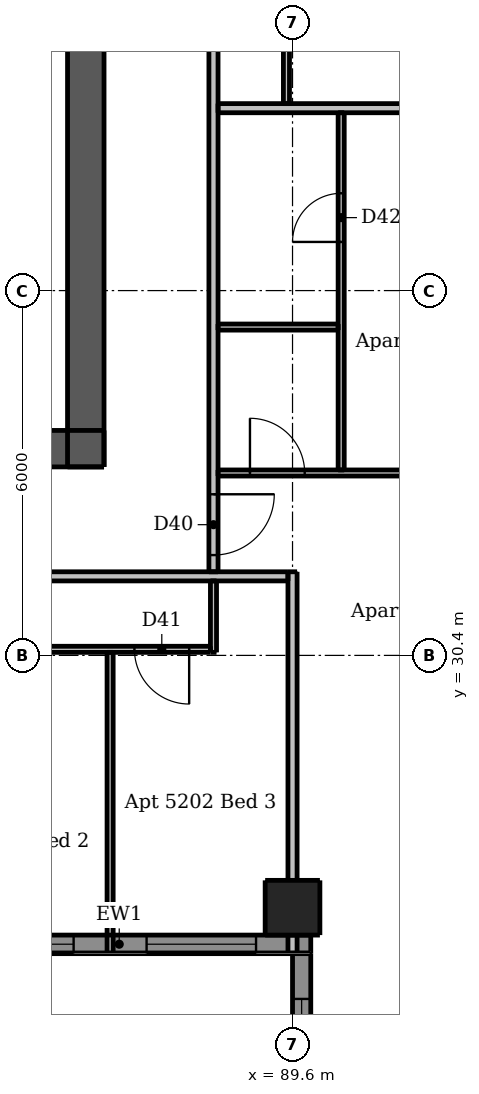
"""IFC4 building model, lengths in metres.
Left out: names, types, materials, properties, quantities, classifications, styles, units other than length and angle.
Written with IfcOpenShell. Run it as: python <this file> out.ifc"""

import sys

from ifc_helpers import new_model, si_unit, direction, frame, frame_2d, origin, origin_2d, place, context, subcontext, project, spatial, rectangle, extrude, element, fill, save


model = new_model("IFC4")
c1 = context("Model", 3, precision=1e-05, world=origin(), true_north=direction((0.0, 1.0)))
c2 = subcontext(c1, "Body", "Model", "MODEL_VIEW")
j1 = project(units=[si_unit("LENGTHUNIT", "METRE"), si_unit("PLANEANGLEUNIT", "RADIAN")], contexts=[c1])
p1 = place(None, origin())
s1 = spatial("IfcSite", under=j1, at=p1, CompositionType="ELEMENT")
p2 = place(p1, origin())
s2 = spatial("IfcBuilding", under=s1, at=p2, CompositionType="ELEMENT")
p3 = place(p2, frame((0.0, 0.0, 196.9)))
s3 = spatial("IfcBuildingStorey", under=s2, at=p3, CompositionType="ELEMENT", Elevation=196.9)
p4 = place(p3, frame((62.5, 33.8, 0.0), z_axis=(0.0, 0.0, 1.0), x_axis=(1.0, 0.0, 0.0)))
e1 = element("IfcWall", 1, at=p4, inside=s3, PredefinedType="SHEAR", context=c2, shape_type="SweptSolid", body=[
    extrude(rectangle(XDim=24.0, YDim=0.6, at=frame_2d((12.0, 0.0))), origin(), (0.0, 0.0, 1.0), 3.05),
])
p5 = place(p4, frame((1.925, 0.0, 0.0)))
e2 = element("IfcOpeningElement", 2, at=p5, cuts=e1, PredefinedType="OPENING", context=c2, shape_type="SweptSolid", body=[
    extrude(rectangle(XDim=1.1, YDim=2.1, at=frame_2d((0.55, 1.05))), frame((0.0, 0.31, 0.0), z_axis=(0.0, -1.0, 0.0), x_axis=(1.0, 0.0, 0.0)), (0.0, 0.0, 1.0), 0.62),
])
p6 = place(p4, frame((20.975, 0.0, 0.0)))
e3 = element("IfcOpeningElement", 3, at=p6, cuts=e1, PredefinedType="OPENING", context=c2, shape_type="SweptSolid", body=[
    extrude(rectangle(XDim=1.1, YDim=2.1, at=frame_2d((0.55, 1.05))), frame((0.0, 0.31, 0.0), z_axis=(0.0, -1.0, 0.0), x_axis=(1.0, 0.0, 0.0)), (0.0, 0.0, 1.0), 0.62),
])
p7 = place(p4, frame((8.0, 0.0, 0.0)))
e4 = element("IfcOpeningElement", 4, at=p7, cuts=e1, PredefinedType="OPENING", context=c2, shape_type="SweptSolid", body=[
    extrude(rectangle(XDim=1.1, YDim=2.1, at=frame_2d((0.55, 1.05))), frame((0.0, 0.31, 0.0), z_axis=(0.0, -1.0, 0.0), x_axis=(1.0, 0.0, 0.0)), (0.0, 0.0, 1.0), 0.62),
])
p8 = place(p4, frame((15.3, 0.0, 0.0)))
e5 = element("IfcOpeningElement", 5, at=p8, cuts=e1, PredefinedType="OPENING", context=c2, shape_type="SweptSolid", body=[
    extrude(rectangle(XDim=0.9, YDim=2.1, at=frame_2d((0.45, 1.05))), frame((0.0, 0.31, 0.0), z_axis=(0.0, -1.0, 0.0), x_axis=(1.0, 0.0, 0.0)), (0.0, 0.0, 1.0), 0.62),
])
p9 = place(p3, frame((86.2, 33.5, 0.0), z_axis=(0.0, 0.0, 1.0), x_axis=(0.0, 1.0, 0.0)))
e6 = element("IfcWall", 6, at=p9, inside=s3, PredefinedType="SHEAR", context=c2, shape_type="SweptSolid", body=[
    extrude(rectangle(XDim=24.0, YDim=0.6, at=frame_2d((12.0, 0.0))), origin(), (0.0, 0.0, 1.0), 3.05),
])
p10 = place(p9, frame((11.2, 0.0, 0.0)))
e7 = element("IfcOpeningElement", 7, at=p10, cuts=e6, PredefinedType="OPENING", context=c2, shape_type="SweptSolid", body=[
    extrude(rectangle(XDim=1.6, YDim=2.1, at=frame_2d((0.8, 1.05))), frame((0.0, 0.31, 0.0), z_axis=(0.0, -1.0, 0.0), x_axis=(1.0, 0.0, 0.0)), (0.0, 0.0, 1.0), 0.62),
])
p11 = place(p3, frame((89.6, 26.25, 0.0), z_axis=(0.0, 0.0, 1.0), x_axis=(1.0, 0.0, 0.0)))
e8 = element("IfcColumn", 8, at=p11, inside=s3, PredefinedType="COLUMN", context=c2, shape_type="SweptSolid", body=[
    extrude(rectangle(XDim=0.9, YDim=0.9, at=origin_2d()), origin(), (0.0, 0.0, 1.0), 3.05),
])
p12 = place(p3, frame((89.75, 25.5, 0.0), z_axis=(0.0, 0.0, 1.0), x_axis=(0.0, -1.0, 0.0)))
e9 = element("IfcWall", 9, at=p12, inside=s3, PredefinedType="SOLIDWALL", context=c2, shape_type="SweptSolid", body=[
    extrude(rectangle(XDim=3.0, YDim=0.3, at=frame_2d((1.5, 0.0))), origin(), (0.0, 0.0, 1.0), 3.05),
])
p13 = place(p12, frame((0.75, 0.0, 0.9)))
e10 = element("IfcOpeningElement", 10, at=p13, cuts=e9, PredefinedType="OPENING", context=c2, shape_type="SweptSolid", body=[
    extrude(rectangle(XDim=1.5, YDim=1.5, at=frame_2d((0.75, 0.75))), frame((0.0, 0.16, 0.0), z_axis=(0.0, -1.0, 0.0), x_axis=(1.0, 0.0, 0.0)), (0.0, 0.0, 1.0), 0.32),
])
p14 = place(p3, frame((83.6, 25.65, 0.0), z_axis=(0.0, 0.0, 1.0), x_axis=(1.0, 0.0, 0.0)))
e11 = element("IfcWall", 11, at=p14, inside=s3, PredefinedType="SOLIDWALL", context=c2, shape_type="SweptSolid", body=[
    extrude(rectangle(XDim=6.3, YDim=0.3, at=frame_2d((3.15, 0.0))), origin(), (0.0, 0.0, 1.0), 3.05),
])
p15 = place(p14, frame((0.6, 0.0, 0.15)))
e12 = element("IfcOpeningElement", 12, at=p15, cuts=e11, PredefinedType="OPENING", context=c2, shape_type="SweptSolid", body=[
    extrude(rectangle(XDim=1.8, YDim=2.1, at=frame_2d((0.9, 1.05))), frame((0.0, 0.16, 0.0), z_axis=(0.0, -1.0, 0.0), x_axis=(1.0, 0.0, 0.0)), (0.0, 0.0, 1.0), 0.32),
])
p16 = place(p14, frame((3.6, 0.0, 0.15)))
e13 = element("IfcOpeningElement", 13, at=p16, cuts=e11, PredefinedType="OPENING", context=c2, shape_type="SweptSolid", body=[
    extrude(rectangle(XDim=1.8, YDim=2.1, at=frame_2d((0.9, 1.05))), frame((0.0, 0.16, 0.0), z_axis=(0.0, -1.0, 0.0), x_axis=(1.0, 0.0, 0.0)), (0.0, 0.0, 1.0), 0.32),
])
p17 = place(p3, frame((86.6, 25.5, 0.0), z_axis=(0.0, 0.0, 1.0), x_axis=(0.0, 1.0, 0.0)))
e14 = element("IfcWall", 14, at=p17, inside=s3, PredefinedType="PARTITIONING", context=c2, shape_type="SweptSolid", body=[
    extrude(rectangle(XDim=4.95, YDim=0.1, at=frame_2d((2.475, 0.0))), origin(), (0.0, 0.0, 1.0), 3.05),
])
p18 = place(p3, frame((88.3, 30.45, 0.0), z_axis=(0.0, 0.0, 1.0), x_axis=(0.0, 1.0, 0.0)))
e15 = element("IfcWall", 15, at=p18, inside=s3, PredefinedType="PARTITIONING", context=c2, shape_type="SweptSolid", body=[
    extrude(rectangle(XDim=1.175, YDim=0.1, at=frame_2d((0.587, 0.0))), origin(), (0.0, 0.0, 1.0), 3.05),
])
p19 = place(p3, frame((89.5, 60.325, 0.0), z_axis=(0.0, 0.0, 1.0), x_axis=(0.0, -1.0, 0.0)))
e16 = element("IfcWall", 16, at=p19, inside=s3, PredefinedType="PARTITIONING", context=c2, shape_type="SweptSolid", body=[
    extrude(rectangle(XDim=20.85, YDim=0.1, at=frame_2d((10.425, 0.0))), origin(), (0.0, 0.0, 1.0), 2.51),
])
p20 = place(p19, frame((10.575, 0.0, 0.0)))
e17 = element("IfcOpeningElement", 17, at=p20, cuts=e16, PredefinedType="OPENING", context=c2, shape_type="SweptSolid", body=[
    extrude(rectangle(XDim=0.9, YDim=2.1, at=frame_2d((0.45, 1.05))), frame((0.0, 0.06, 0.0), z_axis=(0.0, -1.0, 0.0), x_axis=(1.0, 0.0, 0.0)), (0.0, 0.0, 1.0), 0.12),
])
p21 = place(p19, frame((6.675, 0.0, 0.0)))
e18 = element("IfcOpeningElement", 18, at=p21, cuts=e16, PredefinedType="OPENING", context=c2, shape_type="SweptSolid", body=[
    extrude(rectangle(XDim=0.9, YDim=2.1, at=frame_2d((0.45, 1.05))), frame((0.0, 0.06, 0.0), z_axis=(0.0, -1.0, 0.0), x_axis=(1.0, 0.0, 0.0)), (0.0, 0.0, 1.0), 0.12),
])
p22 = place(p19, frame((8.775, 0.0, 0.0)))
e19 = element("IfcOpeningElement", 19, at=p22, cuts=e16, PredefinedType="OPENING", context=c2, shape_type="SweptSolid", body=[
    extrude(rectangle(XDim=0.9, YDim=2.1, at=frame_2d((0.45, 1.05))), frame((0.0, 0.06, 0.0), z_axis=(0.0, -1.0, 0.0), x_axis=(1.0, 0.0, 0.0)), (0.0, 0.0, 1.0), 0.12),
])
p23 = place(p19, frame((19.075, 0.0, 0.0)))
e20 = element("IfcOpeningElement", 20, at=p23, cuts=e16, PredefinedType="OPENING", context=c2, shape_type="SweptSolid", body=[
    extrude(rectangle(XDim=0.9, YDim=2.1, at=frame_2d((0.45, 1.05))), frame((0.0, 0.06, 0.0), z_axis=(0.0, -1.0, 0.0), x_axis=(1.0, 0.0, 0.0)), (0.0, 0.0, 1.0), 0.12),
])
p24 = place(p19, frame((15.775, 0.0, 0.0)))
e21 = element("IfcOpeningElement", 21, at=p24, cuts=e16, PredefinedType="OPENING", context=c2, shape_type="SweptSolid", body=[
    extrude(rectangle(XDim=0.9, YDim=2.1, at=frame_2d((0.45, 1.05))), frame((0.0, 0.06, 0.0), z_axis=(0.0, -1.0, 0.0), x_axis=(1.0, 0.0, 0.0)), (0.0, 0.0, 1.0), 0.12),
])
p25 = place(p19, frame((1.275, 0.0, 0.0)))
e22 = element("IfcOpeningElement", 22, at=p25, cuts=e16, PredefinedType="OPENING", context=c2, shape_type="SweptSolid", body=[
    extrude(rectangle(XDim=0.9, YDim=2.1, at=frame_2d((0.45, 1.05))), frame((0.0, 0.06, 0.0), z_axis=(0.0, -1.0, 0.0), x_axis=(1.0, 0.0, 0.0)), (0.0, 0.0, 1.0), 0.12),
])
p26 = place(p19, frame((12.725, 0.0, 0.0)))
e23 = element("IfcOpeningElement", 23, at=p26, cuts=e16, PredefinedType="OPENING", context=c2, shape_type="SweptSolid", body=[
    extrude(rectangle(XDim=0.8, YDim=2.1, at=frame_2d((0.4, 1.05))), frame((0.0, 0.06, 0.0), z_axis=(0.0, -1.0, 0.0), x_axis=(1.0, 0.0, 0.0)), (0.0, 0.0, 1.0), 0.12),
])
p27 = place(p19, frame((4.325, 0.0, 0.0)))
e24 = element("IfcOpeningElement", 24, at=p27, cuts=e16, PredefinedType="OPENING", context=c2, shape_type="SweptSolid", body=[
    extrude(rectangle(XDim=0.8, YDim=2.1, at=frame_2d((0.4, 1.05))), frame((0.0, 0.06, 0.0), z_axis=(0.0, -1.0, 0.0), x_axis=(1.0, 0.0, 0.0)), (0.0, 0.0, 1.0), 0.12),
])
p28 = place(p3, frame((90.4, 33.45, 0.0), z_axis=(0.0, 0.0, 1.0), x_axis=(0.0, 1.0, 0.0)))
e25 = element("IfcWall", 25, at=p28, inside=s3, PredefinedType="PARTITIONING", context=c2, shape_type="SweptSolid", body=[
    extrude(rectangle(XDim=5.875, YDim=0.1, at=frame_2d((2.938, 0.0))), origin(), (0.0, 0.0, 1.0), 3.05),
])
p29 = place(p28, frame((3.75, 0.0, 0.0)))
e26 = element("IfcOpeningElement", 26, at=p29, cuts=e25, PredefinedType="OPENING", context=c2, shape_type="SweptSolid", body=[
    extrude(rectangle(XDim=0.8, YDim=2.1, at=frame_2d((0.4, 1.05))), frame((0.0, 0.06, 0.0), z_axis=(0.0, -1.0, 0.0), x_axis=(1.0, 0.0, 0.0)), (0.0, 0.0, 1.0), 0.12),
])
p30 = place(p3, frame((88.375, 35.8, 0.0), z_axis=(0.0, 0.0, 1.0), x_axis=(1.0, 0.0, 0.0)))
e27 = element("IfcWall", 27, at=p30, inside=s3, PredefinedType="PARTITIONING", context=c2, shape_type="SweptSolid", body=[
    extrude(rectangle(XDim=1.975, YDim=0.1, at=frame_2d((0.988, 0.0))), origin(), (0.0, 0.0, 1.0), 3.05),
])
p31 = place(p3, frame((88.375, 33.4, 0.0), z_axis=(0.0, 0.0, 1.0), x_axis=(1.0, 0.0, 0.0)))
e28 = element("IfcWall", 28, at=p31, inside=s3, PredefinedType="PARTITIONING", context=c2, shape_type="SweptSolid", body=[
    extrude(rectangle(XDim=7.625, YDim=0.1, at=frame_2d((3.812, 0.0))), origin(), (0.0, 0.0, 1.0), 3.05),
])
p32 = place(p31, frame((0.525, 0.0, 0.0)))
e29 = element("IfcOpeningElement", 29, at=p32, cuts=e28, PredefinedType="OPENING", context=c2, shape_type="SweptSolid", body=[
    extrude(rectangle(XDim=0.9, YDim=2.1, at=frame_2d((0.45, 1.05))), frame((0.0, 0.06, 0.0), z_axis=(0.0, -1.0, 0.0), x_axis=(1.0, 0.0, 0.0)), (0.0, 0.0, 1.0), 0.12),
])
p33 = place(p31, frame((4.375, 0.0, 0.0)))
e30 = element("IfcOpeningElement", 30, at=p33, cuts=e28, PredefinedType="OPENING", context=c2, shape_type="SweptSolid", body=[
    extrude(rectangle(XDim=0.9, YDim=2.1, at=frame_2d((0.45, 1.05))), frame((0.0, 0.06, 0.0), z_axis=(0.0, -1.0, 0.0), x_axis=(1.0, 0.0, 0.0)), (0.0, 0.0, 1.0), 0.12),
])
p34 = place(p3, frame((88.25, 30.5, 0.0), z_axis=(0.0, 0.0, 1.0), x_axis=(-1.0, 0.0, 0.0)))
e31 = element("IfcWall", 31, at=p34, inside=s3, PredefinedType="PARTITIONING", context=c2, shape_type="SweptSolid", body=[
    extrude(rectangle(XDim=16.575, YDim=0.1, at=frame_2d((8.288, 0.0))), origin(), (0.0, 0.0, 1.0), 3.05),
])
p35 = place(p34, frame((15.3, 0.0, 0.0)))
e32 = element("IfcOpeningElement", 32, at=p35, cuts=e31, PredefinedType="OPENING", context=c2, shape_type="SweptSolid", body=[
    extrude(rectangle(XDim=0.9, YDim=2.1, at=frame_2d((0.45, 1.05))), frame((0.0, 0.06, 0.0), z_axis=(0.0, -1.0, 0.0), x_axis=(1.0, 0.0, 0.0)), (0.0, 0.0, 1.0), 0.12),
])
p36 = place(p34, frame((11.4, 0.0, 0.0)))
e33 = element("IfcOpeningElement", 33, at=p36, cuts=e31, PredefinedType="OPENING", context=c2, shape_type="SweptSolid", body=[
    extrude(rectangle(XDim=0.9, YDim=2.1, at=frame_2d((0.45, 1.05))), frame((0.0, 0.06, 0.0), z_axis=(0.0, -1.0, 0.0), x_axis=(1.0, 0.0, 0.0)), (0.0, 0.0, 1.0), 0.12),
])
p37 = place(p34, frame((13.5, 0.0, 0.0)))
e34 = element("IfcOpeningElement", 34, at=p37, cuts=e31, PredefinedType="OPENING", context=c2, shape_type="SweptSolid", body=[
    extrude(rectangle(XDim=0.9, YDim=2.1, at=frame_2d((0.45, 1.05))), frame((0.0, 0.06, 0.0), z_axis=(0.0, -1.0, 0.0), x_axis=(1.0, 0.0, 0.0)), (0.0, 0.0, 1.0), 0.12),
])
p38 = place(p34, frame((8.7, 0.0, 0.0)))
e35 = element("IfcOpeningElement", 35, at=p38, cuts=e31, PredefinedType="OPENING", context=c2, shape_type="SweptSolid", body=[
    extrude(rectangle(XDim=0.9, YDim=2.1, at=frame_2d((0.45, 1.05))), frame((0.0, 0.06, 0.0), z_axis=(0.0, -1.0, 0.0), x_axis=(1.0, 0.0, 0.0)), (0.0, 0.0, 1.0), 0.12),
])
p39 = place(p34, frame((3.0, 0.0, 0.0)))
e36 = element("IfcOpeningElement", 36, at=p39, cuts=e31, PredefinedType="OPENING", context=c2, shape_type="SweptSolid", body=[
    extrude(rectangle(XDim=0.9, YDim=2.1, at=frame_2d((0.45, 1.05))), frame((0.0, 0.06, 0.0), z_axis=(0.0, -1.0, 0.0), x_axis=(1.0, 0.0, 0.0)), (0.0, 0.0, 1.0), 0.12),
])
p40 = place(p34, frame((0.35, 0.0, 0.0)))
e37 = element("IfcOpeningElement", 37, at=p40, cuts=e31, PredefinedType="OPENING", context=c2, shape_type="SweptSolid", body=[
    extrude(rectangle(XDim=0.9, YDim=2.1, at=frame_2d((0.45, 1.05))), frame((0.0, 0.06, 0.0), z_axis=(0.0, -1.0, 0.0), x_axis=(1.0, 0.0, 0.0)), (0.0, 0.0, 1.0), 0.12),
])
p41 = place(p34, frame((6.05, 0.0, 0.0)))
e38 = element("IfcOpeningElement", 38, at=p41, cuts=e31, PredefinedType="OPENING", context=c2, shape_type="SweptSolid", body=[
    extrude(rectangle(XDim=0.8, YDim=2.1, at=frame_2d((0.4, 1.05))), frame((0.0, 0.06, 0.0), z_axis=(0.0, -1.0, 0.0), x_axis=(1.0, 0.0, 0.0)), (0.0, 0.0, 1.0), 0.12),
])
p42 = place(p3, frame((88.3, 61.175, 0.0), z_axis=(0.0, 0.0, 1.0), x_axis=(0.0, -1.0, 0.0)))
e39 = element("IfcWall", 39, at=p42, inside=s3, PredefinedType="PARTITIONING", context=c2, shape_type="SweptSolid", body=[
    extrude(rectangle(XDim=29.4, YDim=0.15, at=frame_2d((14.7, 0.0))), origin(), (0.0, 0.0, 1.0), 3.05),
])
p43 = place(p42, frame((28.125, 0.0, 0.0)))
e40 = element("IfcOpeningElement", 40, at=p43, cuts=e39, PredefinedType="OPENING", context=c2, shape_type="SweptSolid", body=[
    extrude(rectangle(XDim=1.0, YDim=2.1, at=frame_2d((0.5, 1.05))), frame((0.0, 0.085, 0.0), z_axis=(0.0, -1.0, 0.0), x_axis=(1.0, 0.0, 0.0)), (0.0, 0.0, 1.0), 0.17),
])
p44 = place(p42, frame((10.775, 0.0, 0.0)))
e41 = element("IfcOpeningElement", 41, at=p44, cuts=e39, PredefinedType="OPENING", context=c2, shape_type="SweptSolid", body=[
    extrude(rectangle(XDim=1.0, YDim=2.1, at=frame_2d((0.5, 1.05))), frame((0.0, 0.085, 0.0), z_axis=(0.0, -1.0, 0.0), x_axis=(1.0, 0.0, 0.0)), (0.0, 0.0, 1.0), 0.17),
])
p45 = place(p3, frame((89.6, 25.5, 0.0), z_axis=(0.0, 0.0, 1.0), x_axis=(0.0, 1.0, 0.0)))
e42 = element("IfcWall", 42, at=p45, inside=s3, PredefinedType="PARTITIONING", context=c2, shape_type="SweptSolid", body=[
    extrude(rectangle(XDim=6.275, YDim=0.15, at=frame_2d((3.137, 0.0))), origin(), (0.0, 0.0, 1.0), 2.516),
])
p46 = place(p3, frame((88.375, 39.4, 0.0), z_axis=(0.0, 0.0, 1.0), x_axis=(1.0, 0.0, 0.0)))
e43 = element("IfcWall", 43, at=p46, inside=s3, PredefinedType="PARTITIONING", context=c2, shape_type="SweptSolid", body=[
    extrude(rectangle(XDim=6.125, YDim=0.15, at=frame_2d((3.062, 0.0))), origin(), (0.0, 0.0, 1.0), 3.05),
])
p47 = place(p3, frame((89.525, 31.7, 0.0), z_axis=(0.0, 0.0, 1.0), x_axis=(-1.0, 0.0, 0.0)))
e44 = element("IfcWall", 44, at=p47, inside=s3, PredefinedType="PARTITIONING", context=c2, shape_type="SweptSolid", body=[
    extrude(rectangle(XDim=30.55, YDim=0.15, at=frame_2d((15.275, 0.0))), origin(), (0.0, 0.0, 1.0), 3.05),
])
p48 = place(p47, frame((26.775, 0.0, 0.0)))
e45 = element("IfcOpeningElement", 45, at=p48, cuts=e44, PredefinedType="OPENING", context=c2, shape_type="SweptSolid", body=[
    extrude(rectangle(XDim=1.0, YDim=2.1, at=frame_2d((0.5, 1.05))), frame((0.0, 0.085, 0.0), z_axis=(0.0, -1.0, 0.0), x_axis=(1.0, 0.0, 0.0)), (0.0, 0.0, 1.0), 0.17),
])
p49 = place(p47, frame((9.075, 0.0, 0.0)))
e46 = element("IfcOpeningElement", 46, at=p49, cuts=e44, PredefinedType="OPENING", context=c2, shape_type="SweptSolid", body=[
    extrude(rectangle(XDim=1.0, YDim=2.1, at=frame_2d((0.5, 1.05))), frame((0.0, 0.085, 0.0), z_axis=(0.0, -1.0, 0.0), x_axis=(1.0, 0.0, 0.0)), (0.0, 0.0, 1.0), 0.17),
])
p50 = place(p13, origin())
e47 = element("IfcWindow", 47, at=p50, inside=s3, PartitioningType="DOUBLE_PANEL_VERTICAL", PredefinedType="WINDOW", context=c2, shape_type="SweptSolid", body=[
    extrude(rectangle(XDim=1.5, YDim=1.5, at=frame_2d((0.75, 0.75))), frame((0.0, 0.03, 0.0), z_axis=(0.0, -1.0, 0.0), x_axis=(1.0, 0.0, 0.0)), (0.0, 0.0, 1.0), 0.06),
])
fill(e10, e47)
p51 = place(p15, origin())
e48 = element("IfcWindow", 48, at=p51, inside=s3, PartitioningType="DOUBLE_PANEL_VERTICAL", PredefinedType="WINDOW", context=c2, shape_type="SweptSolid", body=[
    extrude(rectangle(XDim=1.8, YDim=2.1, at=frame_2d((0.9, 1.05))), frame((0.0, 0.03, 0.0), z_axis=(0.0, -1.0, 0.0), x_axis=(1.0, 0.0, 0.0)), (0.0, 0.0, 1.0), 0.06),
])
fill(e12, e48)
p52 = place(p16, origin())
e49 = element("IfcWindow", 49, at=p52, inside=s3, PartitioningType="DOUBLE_PANEL_VERTICAL", PredefinedType="WINDOW", context=c2, shape_type="SweptSolid", body=[
    extrude(rectangle(XDim=1.8, YDim=2.1, at=frame_2d((0.9, 1.05))), frame((0.0, 0.03, 0.0), z_axis=(0.0, -1.0, 0.0), x_axis=(1.0, 0.0, 0.0)), (0.0, 0.0, 1.0), 0.06),
])
fill(e13, e49)
p53 = place(p40, origin())
e50 = element("IfcDoor", 50, at=p53, inside=s3, OperationType="SINGLE_SWING_LEFT", PredefinedType="DOOR", context=c2, shape_type="SweptSolid", body=[
    extrude(rectangle(XDim=0.9, YDim=2.1, at=frame_2d((0.45, 1.05))), frame((0.0, 0.025, 0.0), z_axis=(0.0, -1.0, 0.0), x_axis=(1.0, 0.0, 0.0)), (0.0, 0.0, 1.0), 0.05),
])
fill(e37, e50)
p54 = place(p43, origin())
e51 = element("IfcDoor", 51, at=p54, inside=s3, OperationType="SINGLE_SWING_LEFT", PredefinedType="DOOR", context=c2, shape_type="SweptSolid", body=[
    extrude(rectangle(XDim=1.0, YDim=2.1, at=frame_2d((0.5, 1.05))), frame((0.0, 0.025, 0.0), z_axis=(0.0, -1.0, 0.0), x_axis=(1.0, 0.0, 0.0)), (0.0, 0.0, 1.0), 0.05),
])
fill(e40, e51)
p55 = place(p32, origin())
e52 = element("IfcDoor", 52, at=p55, inside=s3, OperationType="SINGLE_SWING_LEFT", PredefinedType="DOOR", context=c2, shape_type="SweptSolid", body=[
    extrude(rectangle(XDim=0.9, YDim=2.1, at=frame_2d((0.45, 1.05))), frame((0.0, 0.025, 0.0), z_axis=(0.0, -1.0, 0.0), x_axis=(1.0, 0.0, 0.0)), (0.0, 0.0, 1.0), 0.05),
])
fill(e29, e52)
p56 = place(p29, origin())
e53 = element("IfcDoor", 53, at=p56, inside=s3, OperationType="SINGLE_SWING_LEFT", PredefinedType="DOOR", context=c2, shape_type="SweptSolid", body=[
    extrude(rectangle(XDim=0.8, YDim=2.1, at=frame_2d((0.4, 1.05))), frame((0.0, 0.025, 0.0), z_axis=(0.0, -1.0, 0.0), x_axis=(1.0, 0.0, 0.0)), (0.0, 0.0, 1.0), 0.05),
])
fill(e26, e53)
save(model, sys.argv[1])
